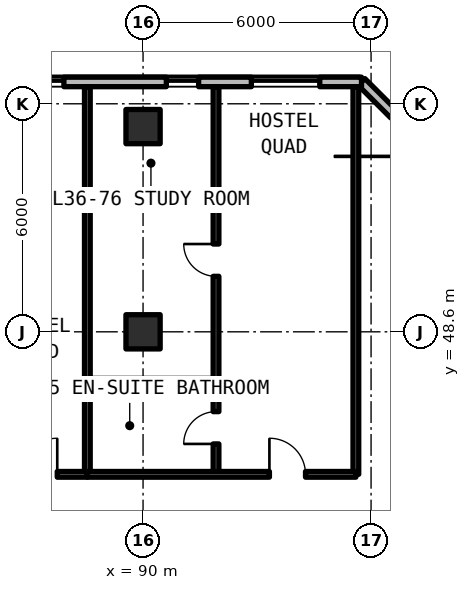
"""IFC4 building model, lengths in metres.
Left out: names, types, materials, properties, quantities, classifications, styles, units other than length and angle.
Written with IfcOpenShell. Run it as: python <this file> out.ifc"""

import sys

from ifc_helpers import new_model, si_unit, direction, frame, frame_2d, origin, origin_2d, place, context, subcontext, project, spatial, rectangle, extrude, element, fill, save


model = new_model("IFC4")
c1 = context("Model", 3, precision=1e-05, world=origin(), true_north=direction((0.0, 1.0)))
c2 = subcontext(c1, "Body", "Model", "MODEL_VIEW")
j1 = project(units=[si_unit("LENGTHUNIT", "METRE"), si_unit("PLANEANGLEUNIT", "RADIAN")], contexts=[c1])
p1 = place(None, origin())
s1 = spatial("IfcSite", under=j1, at=p1, CompositionType="ELEMENT")
p2 = place(p1, origin())
s2 = spatial("IfcBuilding", under=s1, at=p2, CompositionType="ELEMENT")
p3 = place(p2, frame((0.0, 0.0, 132.0)))
s3 = spatial("IfcBuildingStorey", under=s2, at=p3, CompositionType="ELEMENT", Elevation=132.0)
for number, where, z_axis, x_axis in (
    (1, (90.0, 48.6, 0.0), (0.0, 0.0, 1.0), (1.0, 0.0, 0.0)),
    (2, (90.0, 54.0, 0.0), (0.0, 0.0, 1.0), (1.0, 0.0, 0.0)),
):
    element("IfcColumn", number, at=place(p3, frame(where, z_axis=z_axis, x_axis=x_axis)), inside=s3, PredefinedType="COLUMN", context=c2, shape_type="SweptSolid", body=[
        extrude(rectangle(XDim=0.9, YDim=0.9, at=origin_2d()), origin(), (0.0, 0.0, 1.0), 3.3),
    ])
p4 = place(p3, frame((99.875, 51.048, 0.0), z_axis=(0.0, 0.0, 1.0), x_axis=(-0.70708586489, 0.707127696864, 0.0)))
e3 = element("IfcWall", 3, at=p4, inside=s3, PredefinedType="SOLIDWALL", context=c2, shape_type="SweptSolid", body=[
    extrude(rectangle(XDim=5.836, YDim=0.25, at=frame_2d((2.918, 0.0))), origin(), (0.0, 0.0, 1.0), 3.08),
])
p5 = place(p4, frame((1.218, 0.0, 0.78)))
e4 = element("IfcOpeningElement", 4, at=p5, cuts=e3, PredefinedType="OPENING", context=c2, shape_type="SweptSolid", body=[
    extrude(rectangle(XDim=3.4, YDim=1.66, at=frame_2d((1.7, 0.83))), frame((0.0, 0.135, 0.0), z_axis=(0.0, -1.0, 0.0), x_axis=(1.0, 0.0, 0.0)), (0.0, 0.0, 1.0), 0.27),
])
p6 = place(p3, frame((95.748, 55.175, 0.0), z_axis=(0.0, 0.0, 1.0), x_axis=(-1.0, 0.0, 0.0)))
e5 = element("IfcWall", 5, at=p6, inside=s3, PredefinedType="SOLIDWALL", context=c2, shape_type="SweptSolid", body=[
    extrude(rectangle(XDim=43.623, YDim=0.25, at=frame_2d((21.812, 0.0))), origin(), (0.0, 0.0, 1.0), 3.08),
])
p7 = place(p6, frame((31.598, 0.0, 0.0)))
e6 = element("IfcOpeningElement", 6, at=p7, cuts=e5, PredefinedType="OPENING", context=c2, shape_type="SweptSolid", body=[
    extrude(rectangle(XDim=1.1, YDim=2.15, at=frame_2d((0.55, 1.075))), frame((0.0, 0.135, 0.0), z_axis=(0.0, -1.0, 0.0), x_axis=(1.0, 0.0, 0.0)), (0.0, 0.0, 1.0), 0.27),
])
p8 = place(p6, frame((15.398, 0.0, 0.0)))
e7 = element("IfcOpeningElement", 7, at=p8, cuts=e5, PredefinedType="OPENING", context=c2, shape_type="SweptSolid", body=[
    extrude(rectangle(XDim=1.1, YDim=2.15, at=frame_2d((0.55, 1.075))), frame((0.0, 0.135, 0.0), z_axis=(0.0, -1.0, 0.0), x_axis=(1.0, 0.0, 0.0)), (0.0, 0.0, 1.0), 0.27),
])
p9 = place(p6, frame((40.333, 0.0, 0.78)))
e8 = element("IfcOpeningElement", 8, at=p9, cuts=e5, PredefinedType="OPENING", context=c2, shape_type="SweptSolid", body=[
    extrude(rectangle(XDim=0.85, YDim=1.65, at=frame_2d((0.425, 0.825))), frame((0.0, 0.135, 0.0), z_axis=(0.0, -1.0, 0.0), x_axis=(1.0, 0.0, 0.0)), (0.0, 0.0, 1.0), 0.27),
])
p10 = place(p6, frame((37.17, 0.0, 0.78)))
e9 = element("IfcOpeningElement", 9, at=p10, cuts=e5, PredefinedType="OPENING", context=c2, shape_type="SweptSolid", body=[
    extrude(rectangle(XDim=1.8, YDim=1.66, at=frame_2d((0.9, 0.83))), frame((0.0, 0.135, 0.0), z_axis=(0.0, -1.0, 0.0), x_axis=(1.0, 0.0, 0.0)), (0.0, 0.0, 1.0), 0.27),
])
p11 = place(p6, frame((27.615, 0.0, 0.78)))
e10 = element("IfcOpeningElement", 10, at=p11, cuts=e5, PredefinedType="OPENING", context=c2, shape_type="SweptSolid", body=[
    extrude(rectangle(XDim=0.85, YDim=1.65, at=frame_2d((0.425, 0.825))), frame((0.0, 0.135, 0.0), z_axis=(0.0, -1.0, 0.0), x_axis=(1.0, 0.0, 0.0)), (0.0, 0.0, 1.0), 0.27),
])
p12 = place(p6, frame((24.516, 0.0, 0.78)))
e11 = element("IfcOpeningElement", 11, at=p12, cuts=e5, PredefinedType="OPENING", context=c2, shape_type="SweptSolid", body=[
    extrude(rectangle(XDim=1.4, YDim=1.65, at=frame_2d((0.7, 0.825))), frame((0.0, 0.135, 0.0), z_axis=(0.0, -1.0, 0.0), x_axis=(1.0, 0.0, 0.0)), (0.0, 0.0, 1.0), 0.27),
])
p13 = place(p6, frame((20.208, 0.0, 0.78)))
e12 = element("IfcOpeningElement", 12, at=p13, cuts=e5, PredefinedType="OPENING", context=c2, shape_type="SweptSolid", body=[
    extrude(rectangle(XDim=0.85, YDim=1.65, at=frame_2d((0.425, 0.825))), frame((0.0, 0.135, 0.0), z_axis=(0.0, -1.0, 0.0), x_axis=(1.0, 0.0, 0.0)), (0.0, 0.0, 1.0), 0.27),
])
p14 = place(p6, frame((12.6, 0.0, 0.78)))
e13 = element("IfcOpeningElement", 13, at=p14, cuts=e5, PredefinedType="OPENING", context=c2, shape_type="SweptSolid", body=[
    extrude(rectangle(XDim=1.4, YDim=1.65, at=frame_2d((0.7, 0.825))), frame((0.0, 0.135, 0.0), z_axis=(0.0, -1.0, 0.0), x_axis=(1.0, 0.0, 0.0)), (0.0, 0.0, 1.0), 0.27),
])
p15 = place(p6, frame((7.831, 0.0, 0.78)))
e14 = element("IfcOpeningElement", 14, at=p15, cuts=e5, PredefinedType="OPENING", context=c2, shape_type="SweptSolid", body=[
    extrude(rectangle(XDim=1.4, YDim=1.65, at=frame_2d((0.7, 0.825))), frame((0.0, 0.135, 0.0), z_axis=(0.0, -1.0, 0.0), x_axis=(1.0, 0.0, 0.0)), (0.0, 0.0, 1.0), 0.27),
])
p16 = place(p6, frame((4.286, 0.0, 0.78)))
e15 = element("IfcOpeningElement", 15, at=p16, cuts=e5, PredefinedType="OPENING", context=c2, shape_type="SweptSolid", body=[
    extrude(rectangle(XDim=0.85, YDim=1.65, at=frame_2d((0.425, 0.825))), frame((0.0, 0.135, 0.0), z_axis=(0.0, -1.0, 0.0), x_axis=(1.0, 0.0, 0.0)), (0.0, 0.0, 1.0), 0.27),
])
p17 = place(p6, frame((1.098, 0.0, 0.78)))
e16 = element("IfcOpeningElement", 16, at=p17, cuts=e5, PredefinedType="OPENING", context=c2, shape_type="SweptSolid", body=[
    extrude(rectangle(XDim=1.8, YDim=1.66, at=frame_2d((0.9, 0.83))), frame((0.0, 0.135, 0.0), z_axis=(0.0, -1.0, 0.0), x_axis=(1.0, 0.0, 0.0)), (0.0, 0.0, 1.0), 0.27),
])
for number, where, z_axis, x_axis in (
    (17, (95.6, 44.85, 0.0), (0.0, 0.0, 1.0), (0.0, 1.0, 0.0)),
    (18, (88.534, 44.85, 0.0), (0.0, 0.0, 1.0), (0.0, 1.0, 0.0)),
):
    element("IfcWall", number, at=place(p3, frame(where, z_axis=z_axis, x_axis=x_axis)), inside=s3, PredefinedType="SOLIDWALL", context=c2, shape_type="SweptSolid", body=[
        extrude(rectangle(XDim=10.2, YDim=0.15, at=frame_2d((5.1, 0.0))), origin(), (0.0, 0.0, 1.0), 2.35),
    ])
p18 = place(p3, frame((81.197, 44.85, 0.0), z_axis=(0.0, 0.0, 1.0), x_axis=(1.0, 0.0, 0.0)))
e19 = element("IfcWall", 19, at=p18, inside=s3, PredefinedType="SOLIDWALL", context=c2, shape_type="SweptSolid", body=[
    extrude(rectangle(XDim=7.337, YDim=0.15, at=frame_2d((3.668, 0.0))), origin(), (0.0, 0.0, 1.0), 2.35),
])
p19 = place(p18, frame((5.595, 0.0, 0.0)))
e20 = element("IfcOpeningElement", 20, at=p19, cuts=e19, PredefinedType="OPENING", context=c2, shape_type="SweptSolid", body=[
    extrude(rectangle(XDim=0.95, YDim=2.15, at=frame_2d((0.475, 1.075))), frame((0.0, 0.085, 0.0), z_axis=(0.0, -1.0, 0.0), x_axis=(1.0, 0.0, 0.0)), (0.0, 0.0, 1.0), 0.17),
])
p20 = place(p3, frame((88.534, 47.3, 0.0), z_axis=(0.0, 0.0, 1.0), x_axis=(1.0, 0.0, 0.0)))
e21 = element("IfcWall", 21, at=p20, inside=s3, PredefinedType="PARTITIONING", context=c2, shape_type="SweptSolid", body=[
    extrude(rectangle(XDim=3.385, YDim=0.15, at=frame_2d((1.693, 0.0))), origin(), (0.0, 0.0, 1.0), 2.35),
])
p21 = place(p3, frame((91.92, 44.85, 0.0), z_axis=(0.0, 0.0, 1.0), x_axis=(0.0, 1.0, 0.0)))
e22 = element("IfcWall", 22, at=p21, inside=s3, PredefinedType="PARTITIONING", context=c2, shape_type="SweptSolid", body=[
    extrude(rectangle(XDim=10.2, YDim=0.15, at=frame_2d((5.1, 0.0))), origin(), (0.0, 0.0, 1.0), 2.35),
])
p22 = place(p21, frame((0.8, 0.0, 0.0)))
e23 = element("IfcOpeningElement", 23, at=p22, cuts=e22, PredefinedType="OPENING", context=c2, shape_type="SweptSolid", body=[
    extrude(rectangle(XDim=0.85, YDim=2.1, at=frame_2d((0.425, 1.05))), frame((0.0, 0.085, 0.0), z_axis=(0.0, -1.0, 0.0), x_axis=(1.0, 0.0, 0.0)), (0.0, 0.0, 1.0), 0.17),
])
p23 = place(p21, frame((5.21, 0.0, 0.0)))
e24 = element("IfcOpeningElement", 24, at=p23, cuts=e22, PredefinedType="OPENING", context=c2, shape_type="SweptSolid", body=[
    extrude(rectangle(XDim=0.85, YDim=2.1, at=frame_2d((0.425, 1.05))), frame((0.0, 0.085, 0.0), z_axis=(0.0, -1.0, 0.0), x_axis=(1.0, 0.0, 0.0)), (0.0, 0.0, 1.0), 0.17),
])
p24 = place(p3, frame((88.534, 44.85, 0.0), z_axis=(0.0, 0.0, 1.0), x_axis=(1.0, 0.0, 0.0)))
e25 = element("IfcWall", 25, at=p24, inside=s3, PredefinedType="SOLIDWALL", context=c2, shape_type="SweptSolid", body=[
    extrude(rectangle(XDim=7.066, YDim=0.15, at=frame_2d((3.533, 0.0))), origin(), (0.0, 0.0, 1.0), 2.35),
])
p25 = place(p24, frame((4.791, 0.0, 0.0)))
e26 = element("IfcOpeningElement", 26, at=p25, cuts=e25, PredefinedType="OPENING", context=c2, shape_type="SweptSolid", body=[
    extrude(rectangle(XDim=0.95, YDim=2.15, at=frame_2d((0.475, 1.075))), frame((0.0, 0.085, 0.0), z_axis=(0.0, -1.0, 0.0), x_axis=(1.0, 0.0, 0.0)), (0.0, 0.0, 1.0), 0.17),
])
p26 = place(p15, origin())
e27 = element("IfcWindow", 27, at=p26, inside=s3, PartitioningType="SINGLE_PANEL", PredefinedType="WINDOW", context=c2, shape_type="SweptSolid", body=[
    extrude(rectangle(XDim=1.4, YDim=1.65, at=frame_2d((0.7, 0.825))), frame((0.0, 0.03, 0.0), z_axis=(0.0, -1.0, 0.0), x_axis=(1.0, 0.0, 0.0)), (0.0, 0.0, 1.0), 0.06),
])
fill(e14, e27)
p27 = place(p16, origin())
e28 = element("IfcWindow", 28, at=p27, inside=s3, PartitioningType="SINGLE_PANEL", PredefinedType="WINDOW", context=c2, shape_type="SweptSolid", body=[
    extrude(rectangle(XDim=0.85, YDim=1.65, at=frame_2d((0.425, 0.825))), frame((0.0, 0.03, 0.0), z_axis=(0.0, -1.0, 0.0), x_axis=(1.0, 0.0, 0.0)), (0.0, 0.0, 1.0), 0.06),
])
fill(e15, e28)
p28 = place(p17, origin())
e29 = element("IfcWindow", 29, at=p28, inside=s3, PartitioningType="SINGLE_PANEL", PredefinedType="WINDOW", context=c2, shape_type="SweptSolid", body=[
    extrude(rectangle(XDim=1.8, YDim=1.66, at=frame_2d((0.9, 0.83))), frame((0.0, 0.03, 0.0), z_axis=(0.0, -1.0, 0.0), x_axis=(1.0, 0.0, 0.0)), (0.0, 0.0, 1.0), 0.06),
])
fill(e16, e29)
p29 = place(p19, origin())
e30 = element("IfcDoor", 30, at=p29, inside=s3, OperationType="SINGLE_SWING_RIGHT", PredefinedType="DOOR", context=c2, shape_type="SweptSolid", body=[
    extrude(rectangle(XDim=0.95, YDim=2.15, at=frame_2d((0.475, 1.075))), frame((0.0, 0.025, 0.0), z_axis=(0.0, -1.0, 0.0), x_axis=(1.0, 0.0, 0.0)), (0.0, 0.0, 1.0), 0.05),
])
fill(e20, e30)
p30 = place(p22, origin())
e31 = element("IfcDoor", 31, at=p30, inside=s3, OperationType="SINGLE_SWING_LEFT", PredefinedType="DOOR", context=c2, shape_type="SweptSolid", body=[
    extrude(rectangle(XDim=0.85, YDim=2.1, at=frame_2d((0.425, 1.05))), frame((0.0, 0.025, 0.0), z_axis=(0.0, -1.0, 0.0), x_axis=(1.0, 0.0, 0.0)), (0.0, 0.0, 1.0), 0.05),
])
fill(e23, e31)
p31 = place(p23, origin())
e32 = element("IfcDoor", 32, at=p31, inside=s3, OperationType="SINGLE_SWING_RIGHT", PredefinedType="DOOR", context=c2, shape_type="SweptSolid", body=[
    extrude(rectangle(XDim=0.85, YDim=2.1, at=frame_2d((0.425, 1.05))), frame((0.0, 0.025, 0.0), z_axis=(0.0, -1.0, 0.0), x_axis=(1.0, 0.0, 0.0)), (0.0, 0.0, 1.0), 0.05),
])
fill(e24, e32)
p32 = place(p25, origin())
e33 = element("IfcDoor", 33, at=p32, inside=s3, OperationType="SINGLE_SWING_LEFT", PredefinedType="DOOR", context=c2, shape_type="SweptSolid", body=[
    extrude(rectangle(XDim=0.95, YDim=2.15, at=frame_2d((0.475, 1.075))), frame((0.0, 0.025, 0.0), z_axis=(0.0, -1.0, 0.0), x_axis=(1.0, 0.0, 0.0)), (0.0, 0.0, 1.0), 0.05),
])
fill(e26, e33)
save(model, sys.argv[1])
